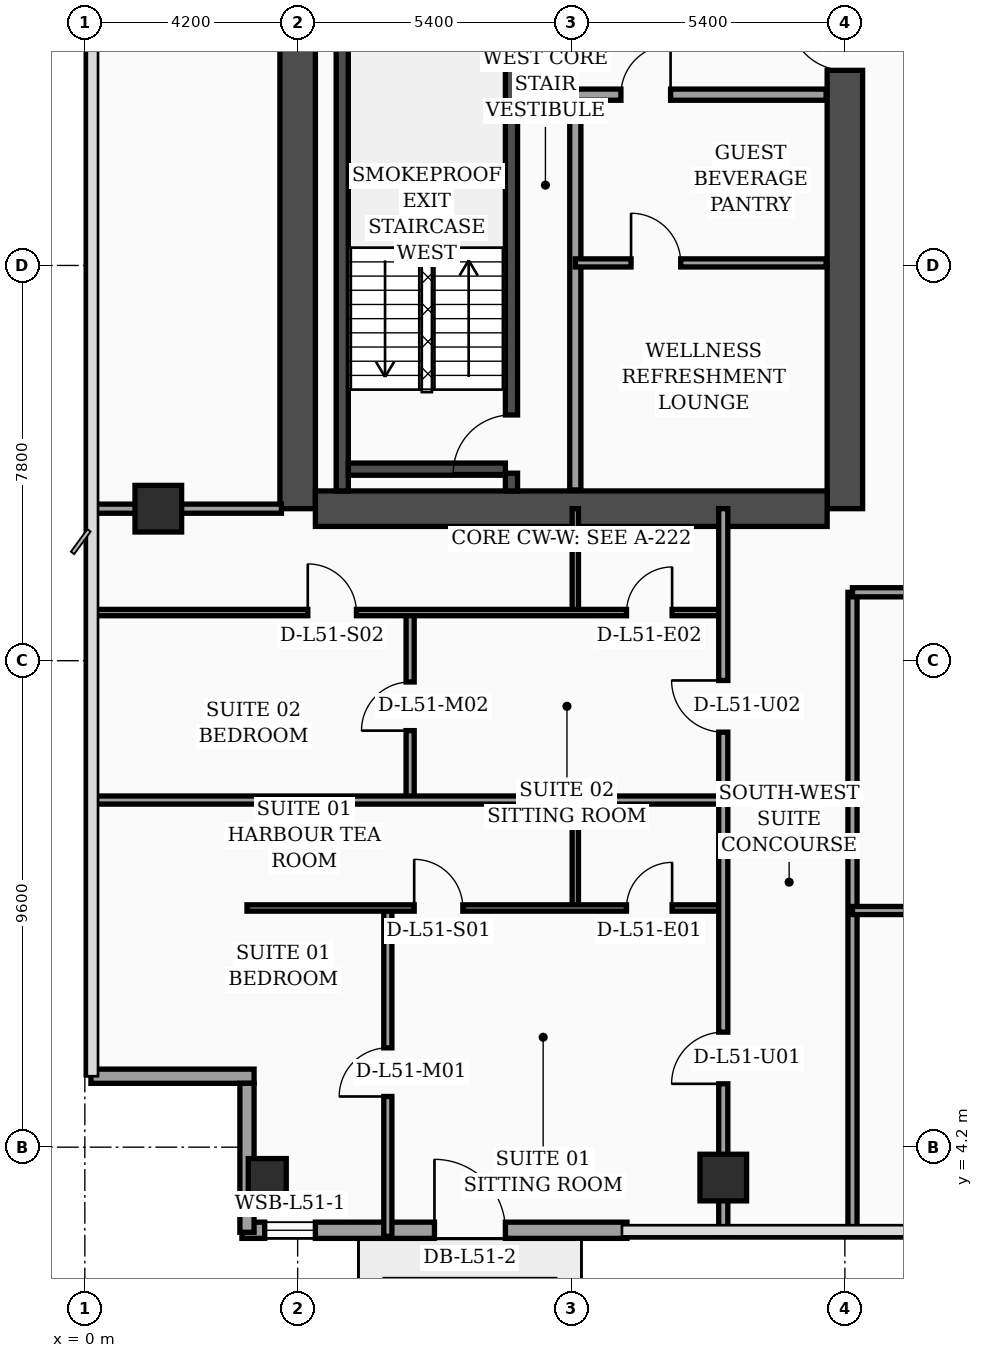
"""IFC4 building model, lengths in metres.
Left out: names, types, materials, properties, quantities, classifications, styles, units other than length and angle.
Written with IfcOpenShell. Run it as: python <this file> out.ifc"""

import sys

from ifc_helpers import new_model, si_unit, direction, frame, frame_2d, origin, origin_2d, place, context, subcontext, project, spatial, rectangle, hollow_rectangle, extrude, element, fill, save


model = new_model("IFC4")
c1 = context("Model", 3, precision=1e-05, world=origin(), true_north=direction((0.0, 1.0)))
c2 = subcontext(c1, "Body", "Model", "MODEL_VIEW")
j1 = project(units=[si_unit("LENGTHUNIT", "METRE"), si_unit("PLANEANGLEUNIT", "RADIAN")], contexts=[c1])
p1 = place(None, origin())
s1 = spatial("IfcSite", under=j1, at=p1, CompositionType="ELEMENT")
p2 = place(p1, origin())
s2 = spatial("IfcBuilding", under=s1, at=p2, CompositionType="ELEMENT")
p3 = place(p2, frame((0.0, 0.0, 207.2)))
s3 = spatial("IfcBuildingStorey", under=s2, at=p3, CompositionType="ELEMENT", Elevation=207.2)
p4 = place(p3, frame((4.2, 16.8, 0.0), z_axis=(0.0, 0.0, 1.0), x_axis=(0.0, 1.0, 0.0)))
e1 = element("IfcWall", 1, at=p4, inside=s3, PredefinedType="SHEAR", context=c2, shape_type="SweptSolid", body=[
    extrude(rectangle(XDim=21.6, YDim=0.7, at=frame_2d((10.8, 0.0))), origin(), (0.0, 0.0, 1.0), 3.56),
])
p5 = place(p3, frame((15.0, 16.8, 0.0), z_axis=(0.0, 0.0, 1.0), x_axis=(0.0, 1.0, 0.0)))
e2 = element("IfcWall", 2, at=p5, inside=s3, PredefinedType="SHEAR", context=c2, shape_type="SweptSolid", body=[
    extrude(rectangle(XDim=21.6, YDim=0.7, at=frame_2d((10.8, 0.0))), origin(), (0.0, 0.0, 1.0), 3.56),
])
p6 = place(p5, frame((8.65, 0.0, 0.0)))
e3 = element("IfcOpeningElement", 3, at=p6, cuts=e2, PredefinedType="OPENING", context=c2, shape_type="SweptSolid", body=[
    extrude(rectangle(XDim=1.1, YDim=2.2, at=frame_2d((0.55, 1.1))), frame((0.0, 0.36, 0.0), z_axis=(0.0, -1.0, 0.0), x_axis=(1.0, 0.0, 0.0)), (0.0, 0.0, 1.0), 0.72),
])
p7 = place(p5, frame((10.85, 0.0, 0.0)))
e4 = element("IfcOpeningElement", 4, at=p7, cuts=e2, PredefinedType="OPENING", context=c2, shape_type="SweptSolid", body=[
    extrude(rectangle(XDim=1.1, YDim=2.2, at=frame_2d((0.55, 1.1))), frame((0.0, 0.36, 0.0), z_axis=(0.0, -1.0, 0.0), x_axis=(1.0, 0.0, 0.0)), (0.0, 0.0, 1.0), 0.72),
])
p8 = place(p5, frame((13.5, 0.0, 0.0)))
e5 = element("IfcOpeningElement", 5, at=p8, cuts=e2, PredefinedType="OPENING", context=c2, shape_type="SweptSolid", body=[
    extrude(rectangle(XDim=1.1, YDim=2.2, at=frame_2d((0.55, 1.1))), frame((0.0, 0.36, 0.0), z_axis=(0.0, -1.0, 0.0), x_axis=(1.0, 0.0, 0.0)), (0.0, 0.0, 1.0), 0.72),
])
p9 = place(p5, frame((16.15, 0.0, 0.0)))
e6 = element("IfcOpeningElement", 6, at=p9, cuts=e2, PredefinedType="OPENING", context=c2, shape_type="SweptSolid", body=[
    extrude(rectangle(XDim=1.1, YDim=2.2, at=frame_2d((0.55, 1.1))), frame((0.0, 0.36, 0.0), z_axis=(0.0, -1.0, 0.0), x_axis=(1.0, 0.0, 0.0)), (0.0, 0.0, 1.0), 0.72),
])
p10 = place(p3, frame((4.55, 16.8, 0.0), z_axis=(0.0, 0.0, 1.0), x_axis=(1.0, 0.0, 0.0)))
e7 = element("IfcWall", 7, at=p10, inside=s3, PredefinedType="SHEAR", context=c2, shape_type="SweptSolid", body=[
    extrude(rectangle(XDim=10.1, YDim=0.7, at=frame_2d((5.05, 0.0))), origin(), (0.0, 0.0, 1.0), 3.56),
])
p11 = place(p3, frame((5.08, 17.15, 0.0), z_axis=(0.0, 0.0, 1.0), x_axis=(0.0, 1.0, 0.0)))
e8 = element("IfcWall", 8, at=p11, inside=s3, PredefinedType="SOLIDWALL", context=c2, shape_type="SweptSolid", body=[
    extrude(rectangle(XDim=9.64, YDim=0.24, at=frame_2d((4.82, 0.0))), origin(), (0.0, 0.0, 1.0), 3.56),
])
p12 = place(p3, frame((8.42, 17.15, 0.0), z_axis=(0.0, 0.0, 1.0), x_axis=(0.0, 1.0, 0.0)))
e9 = element("IfcWall", 9, at=p12, inside=s3, PredefinedType="SOLIDWALL", context=c2, shape_type="SweptSolid", body=[
    extrude(rectangle(XDim=9.64, YDim=0.24, at=frame_2d((4.82, 0.0))), origin(), (0.0, 0.0, 1.0), 3.56),
])
p13 = place(p12, frame((0.35, 0.0, 0.0)))
e10 = element("IfcOpeningElement", 10, at=p13, cuts=e9, PredefinedType="OPENING", context=c2, shape_type="SweptSolid", body=[
    extrude(rectangle(XDim=1.15, YDim=2.2, at=frame_2d((0.575, 1.1))), frame((0.0, 0.13, 0.0), z_axis=(0.0, -1.0, 0.0), x_axis=(1.0, 0.0, 0.0)), (0.0, 0.0, 1.0), 0.26),
])
p14 = place(p3, frame((5.2, 17.58, 0.0), z_axis=(0.0, 0.0, 1.0), x_axis=(1.0, 0.0, 0.0)))
e11 = element("IfcWall", 11, at=p14, inside=s3, PredefinedType="SOLIDWALL", context=c2, shape_type="SweptSolid", body=[
    extrude(rectangle(XDim=3.1, YDim=0.24, at=frame_2d((1.55, 0.0))), origin(), (0.0, 0.0, 1.0), 3.56),
])
p15 = place(p3, frame((3.6, 3.6, 0.0), z_axis=(0.0, 0.0, 1.0), x_axis=(1.0, 0.0, 0.0)))
e12 = element("IfcColumn", 12, at=p15, inside=s3, PredefinedType="COLUMN", context=c2, shape_type="SweptSolid", body=[
    extrude(hollow_rectangle(XDim=0.75, YDim=0.75, WallThickness=0.032, at=origin_2d()), origin(), (0.0, 0.0, 1.0), 3.56),
])
for number, where, z_axis, x_axis in (
    (13, (1.45, 16.8, 0.0), (0.0, 0.0, 1.0), (1.0, 0.0, 0.0)),
    (14, (12.6, 3.6, 0.0), (0.0, 0.0, 1.0), (1.0, 0.0, 0.0)),
):
    element("IfcColumn", number, at=place(p3, frame(where, z_axis=z_axis, x_axis=x_axis)), inside=s3, PredefinedType="COLUMN", context=c2, shape_type="SweptSolid", body=[
        extrude(rectangle(XDim=0.92, YDim=0.92, at=origin_2d()), origin(), (0.0, 0.0, 1.0), 3.56),
    ])
p16 = place(p3, frame((3.1, 2.56, 0.0), z_axis=(0.0, 0.0, 1.0), x_axis=(1.0, 0.0, 0.0)))
e15 = element("IfcWall", 15, at=p16, inside=s3, PredefinedType="SOLIDWALL", context=c2, shape_type="SweptSolid", body=[
    extrude(rectangle(XDim=7.6, YDim=0.32, at=frame_2d((3.8, 0.0))), origin(), (0.0, 0.0, 1.0), 3.56),
])
p17 = place(p16, frame((0.45, 0.0, 0.75)))
e16 = element("IfcOpeningElement", 16, at=p17, cuts=e15, PredefinedType="OPENING", context=c2, shape_type="SweptSolid", body=[
    extrude(rectangle(XDim=1.0, YDim=1.6, at=frame_2d((0.5, 0.8))), frame((0.0, 0.17, 0.0), z_axis=(0.0, -1.0, 0.0), x_axis=(1.0, 0.0, 0.0)), (0.0, 0.0, 1.0), 0.34),
])
p18 = place(p16, frame((3.8, 0.0, 0.0)))
e17 = element("IfcOpeningElement", 17, at=p18, cuts=e15, PredefinedType="OPENING", context=c2, shape_type="SweptSolid", body=[
    extrude(rectangle(XDim=1.4, YDim=2.25, at=frame_2d((0.7, 1.125))), frame((0.0, 0.17, 0.0), z_axis=(0.0, -1.0, 0.0), x_axis=(1.0, 0.0, 0.0)), (0.0, 0.0, 1.0), 0.34),
])
p19 = place(p3, frame((0.12, 5.6, 0.0), z_axis=(0.0, 0.0, 1.0), x_axis=(1.0, 0.0, 0.0)))
e18 = element("IfcWall", 18, at=p19, inside=s3, PredefinedType="SOLIDWALL", context=c2, shape_type="SweptSolid", body=[
    extrude(rectangle(XDim=3.22, YDim=0.28, at=frame_2d((1.61, 0.0))), origin(), (0.0, 0.0, 1.0), 2.94),
])
p20 = place(p3, frame((3.2, 5.46, 0.0), z_axis=(0.0, 0.0, 1.0), x_axis=(0.0, -1.0, 0.0)))
e19 = element("IfcWall", 19, at=p20, inside=s3, PredefinedType="SOLIDWALL", context=c2, shape_type="SweptSolid", body=[
    extrude(rectangle(XDim=2.94, YDim=0.28, at=frame_2d((1.47, 0.0))), origin(), (0.0, 0.0, 1.0), 2.94),
])
p21 = place(p3, frame((9.68, 17.17, 0.0), z_axis=(0.0, 0.0, 1.0), x_axis=(0.0, 1.0, 0.0)))
e20 = element("IfcWall", 20, at=p21, inside=s3, PredefinedType="SOLIDWALL", context=c2, shape_type="SweptSolid", body=[
    extrude(rectangle(XDim=7.83, YDim=0.22, at=frame_2d((3.915, 0.0))), origin(), (0.0, 0.0, 1.0), 3.56),
])
p22 = place(p3, frame((9.68, 21.65, 0.0), z_axis=(0.0, 0.0, 1.0), x_axis=(1.0, 0.0, 0.0)))
e21 = element("IfcWall", 21, at=p22, inside=s3, PredefinedType="PARTITIONING", context=c2, shape_type="SweptSolid", body=[
    extrude(rectangle(XDim=4.95, YDim=0.16, at=frame_2d((2.475, 0.0))), origin(), (0.0, 0.0, 1.0), 3.09),
])
p23 = place(p22, frame((1.1, 0.0, 0.0)))
e22 = element("IfcOpeningElement", 22, at=p23, cuts=e21, PredefinedType="OPENING", context=c2, shape_type="SweptSolid", body=[
    extrude(rectangle(XDim=0.98, YDim=2.15, at=frame_2d((0.49, 1.075))), frame((0.0, 0.09, 0.0), z_axis=(0.0, -1.0, 0.0), x_axis=(1.0, 0.0, 0.0)), (0.0, 0.0, 1.0), 0.18),
])
p24 = place(p3, frame((9.68, 24.97, 0.0), z_axis=(0.0, 0.0, 1.0), x_axis=(1.0, 0.0, 0.0)))
e23 = element("IfcWall", 23, at=p24, inside=s3, PredefinedType="SOLIDWALL", context=c2, shape_type="SweptSolid", body=[
    extrude(rectangle(XDim=4.95, YDim=0.22, at=frame_2d((2.475, 0.0))), origin(), (0.0, 0.0, 1.0), 2.94),
])
p25 = place(p24, frame((0.9, 0.0, 0.0)))
e24 = element("IfcOpeningElement", 24, at=p25, cuts=e23, PredefinedType="OPENING", context=c2, shape_type="SweptSolid", body=[
    extrude(rectangle(XDim=0.98, YDim=2.15, at=frame_2d((0.49, 1.075))), frame((0.0, 0.12, 0.0), z_axis=(0.0, -1.0, 0.0), x_axis=(1.0, 0.0, 0.0)), (0.0, 0.0, 1.0), 0.24),
])
p26 = place(p3, frame((0.08, 16.8, 0.0), z_axis=(0.0, 0.0, 1.0), x_axis=(1.0, 0.0, 0.0)))
e25 = element("IfcWall", 25, at=p26, inside=s3, PredefinedType="PARTITIONING", context=c2, shape_type="SweptSolid", body=[
    extrude(rectangle(XDim=3.8, YDim=0.18, at=frame_2d((1.9, 0.0))), origin(), (0.0, 0.0, 1.0), 2.94),
])
p27 = place(p3, frame((9.68, 8.92, 0.0), z_axis=(0.0, 0.0, 1.0), x_axis=(0.0, 1.0, 0.0)))
e26 = element("IfcWall", 26, at=p27, inside=s3, PredefinedType="PARTITIONING", context=c2, shape_type="SweptSolid", body=[
    extrude(rectangle(XDim=2.13, YDim=0.125, at=frame_2d((1.065, 0.0))), origin(), (0.0, 0.0, 1.0), 3.09),
])
p28 = place(p3, frame((5.98, 2.44, 0.0), z_axis=(0.0, 0.0, 1.0), x_axis=(0.0, 1.0, 0.0)))
e27 = element("IfcWall", 27, at=p28, inside=s3, PredefinedType="PARTITIONING", context=c2, shape_type="SweptSolid", body=[
    extrude(rectangle(XDim=6.48, YDim=0.16, at=frame_2d((3.24, 0.0))), origin(), (0.0, 0.0, 1.0), 3.09),
])
p29 = place(p28, frame((2.76, 0.0, 0.0)))
e28 = element("IfcOpeningElement", 28, at=p29, cuts=e27, PredefinedType="OPENING", context=c2, shape_type="SweptSolid", body=[
    extrude(rectangle(XDim=0.96, YDim=2.2, at=frame_2d((0.48, 1.1))), frame((0.0, 0.09, 0.0), z_axis=(0.0, -1.0, 0.0), x_axis=(1.0, 0.0, 0.0)), (0.0, 0.0, 1.0), 0.18),
])
p30 = place(p3, frame((3.2, 8.92, 0.0), z_axis=(0.0, 0.0, 1.0), x_axis=(1.0, 0.0, 0.0)))
e29 = element("IfcWall", 29, at=p30, inside=s3, PredefinedType="PARTITIONING", context=c2, shape_type="SweptSolid", body=[
    extrude(rectangle(XDim=9.4, YDim=0.125, at=frame_2d((4.7, 0.0))), origin(), (0.0, 0.0, 1.0), 2.94),
])
p31 = place(p30, frame((3.3, 0.0, 0.0)))
e30 = element("IfcOpeningElement", 30, at=p31, cuts=e29, PredefinedType="OPENING", context=c2, shape_type="SweptSolid", body=[
    extrude(rectangle(XDim=0.96, YDim=2.2, at=frame_2d((0.48, 1.1))), frame((0.0, 0.073, 0.0), z_axis=(0.0, -1.0, 0.0), x_axis=(1.0, 0.0, 0.0)), (0.0, 0.0, 1.0), 0.145),
])
p32 = place(p30, frame((7.49, 0.0, 0.0)))
e31 = element("IfcOpeningElement", 31, at=p32, cuts=e29, PredefinedType="OPENING", context=c2, shape_type="SweptSolid", body=[
    extrude(rectangle(XDim=0.9, YDim=2.15, at=frame_2d((0.45, 1.075))), frame((0.0, 0.073, 0.0), z_axis=(0.0, -1.0, 0.0), x_axis=(1.0, 0.0, 0.0)), (0.0, 0.0, 1.0), 0.145),
])
p33 = place(p3, frame((9.68, 14.75, 0.0), z_axis=(0.0, 0.0, 1.0), x_axis=(0.0, 1.0, 0.0)))
e32 = element("IfcWall", 32, at=p33, inside=s3, PredefinedType="PARTITIONING", context=c2, shape_type="SweptSolid", body=[
    extrude(rectangle(XDim=2.05, YDim=0.125, at=frame_2d((1.025, 0.0))), origin(), (0.0, 0.0, 1.0), 3.56),
])
p34 = place(p3, frame((6.42, 11.05, 0.0), z_axis=(0.0, 0.0, 1.0), x_axis=(0.0, 1.0, 0.0)))
e33 = element("IfcWall", 33, at=p34, inside=s3, PredefinedType="PARTITIONING", context=c2, shape_type="SweptSolid", body=[
    extrude(rectangle(XDim=3.7, YDim=0.16, at=frame_2d((1.85, 0.0))), origin(), (0.0, 0.0, 1.0), 3.56),
])
p35 = place(p34, frame((1.37, 0.0, 0.0)))
e34 = element("IfcOpeningElement", 34, at=p35, cuts=e33, PredefinedType="OPENING", context=c2, shape_type="SweptSolid", body=[
    extrude(rectangle(XDim=0.96, YDim=2.2, at=frame_2d((0.48, 1.1))), frame((0.0, 0.09, 0.0), z_axis=(0.0, -1.0, 0.0), x_axis=(1.0, 0.0, 0.0)), (0.0, 0.0, 1.0), 0.18),
])
p36 = place(p3, frame((0.08, 14.75, 0.0), z_axis=(0.0, 0.0, 1.0), x_axis=(1.0, 0.0, 0.0)))
e35 = element("IfcWall", 35, at=p36, inside=s3, PredefinedType="PARTITIONING", context=c2, shape_type="SweptSolid", body=[
    extrude(rectangle(XDim=12.52, YDim=0.125, at=frame_2d((6.26, 0.0))), origin(), (0.0, 0.0, 1.0), 2.94),
])
p37 = place(p36, frame((4.32, 0.0, 0.0)))
e36 = element("IfcOpeningElement", 36, at=p37, cuts=e35, PredefinedType="OPENING", context=c2, shape_type="SweptSolid", body=[
    extrude(rectangle(XDim=0.96, YDim=2.2, at=frame_2d((0.48, 1.1))), frame((0.0, 0.073, 0.0), z_axis=(0.0, -1.0, 0.0), x_axis=(1.0, 0.0, 0.0)), (0.0, 0.0, 1.0), 0.145),
])
p38 = place(p36, frame((10.61, 0.0, 0.0)))
e37 = element("IfcOpeningElement", 37, at=p38, cuts=e35, PredefinedType="OPENING", context=c2, shape_type="SweptSolid", body=[
    extrude(rectangle(XDim=0.9, YDim=2.15, at=frame_2d((0.45, 1.075))), frame((0.0, 0.073, 0.0), z_axis=(0.0, -1.0, 0.0), x_axis=(1.0, 0.0, 0.0)), (0.0, 0.0, 1.0), 0.145),
])
p39 = place(p3, frame((0.08, 11.05, 0.0), z_axis=(0.0, 0.0, 1.0), x_axis=(1.0, 0.0, 0.0)))
e38 = element("IfcWall", 38, at=p39, inside=s3, PredefinedType="PARTITIONING", context=c2, shape_type="SweptSolid", body=[
    extrude(rectangle(XDim=12.52, YDim=0.16, at=frame_2d((6.26, 0.0))), origin(), (0.0, 0.0, 1.0), 2.94),
])
p40 = place(p3, frame((12.6, 2.44, 0.0), z_axis=(0.0, 0.0, 1.0), x_axis=(0.0, 1.0, 0.0)))
e39 = element("IfcWall", 39, at=p40, inside=s3, PredefinedType="PARTITIONING", context=c2, shape_type="SweptSolid", body=[
    extrude(rectangle(XDim=14.36, YDim=0.18, at=frame_2d((7.18, 0.0))), origin(), (0.0, 0.0, 1.0), 2.94),
])
p41 = place(p40, frame((3.01, 0.0, 0.0)))
e40 = element("IfcOpeningElement", 40, at=p41, cuts=e39, PredefinedType="OPENING", context=c2, shape_type="SweptSolid", body=[
    extrude(rectangle(XDim=1.02, YDim=2.2, at=frame_2d((0.51, 1.1))), frame((0.0, 0.1, 0.0), z_axis=(0.0, -1.0, 0.0), x_axis=(1.0, 0.0, 0.0)), (0.0, 0.0, 1.0), 0.2),
])
p42 = place(p40, frame((9.95, 0.0, 0.0)))
e41 = element("IfcOpeningElement", 41, at=p42, cuts=e39, PredefinedType="OPENING", context=c2, shape_type="SweptSolid", body=[
    extrude(rectangle(XDim=1.02, YDim=2.2, at=frame_2d((0.51, 1.1))), frame((0.0, 0.1, 0.0), z_axis=(0.0, -1.0, 0.0), x_axis=(1.0, 0.0, 0.0)), (0.0, 0.0, 1.0), 0.2),
])
p43 = place(p3, frame((15.15, 2.44, 0.0), z_axis=(0.0, 0.0, 1.0), x_axis=(0.0, 1.0, 0.0)))
e42 = element("IfcWall", 42, at=p43, inside=s3, PredefinedType="PARTITIONING", context=c2, shape_type="SweptSolid", body=[
    extrude(rectangle(XDim=12.71, YDim=0.18, at=frame_2d((6.355, 0.0))), origin(), (0.0, 0.0, 1.0), 3.09),
])
p44 = place(p3, frame((15.15, 8.87, 0.0), z_axis=(0.0, 0.0, 1.0), x_axis=(1.0, 0.0, 0.0)))
e43 = element("IfcWall", 43, at=p44, inside=s3, PredefinedType="PARTITIONING", context=c2, shape_type="SweptSolid", body=[
    extrude(rectangle(XDim=4.45, YDim=0.16, at=frame_2d((2.225, 0.0))), origin(), (0.0, 0.0, 1.0), 3.56),
])
p45 = place(p44, frame((1.75, 0.0, 0.0)))
e44 = element("IfcOpeningElement", 44, at=p45, cuts=e43, PredefinedType="OPENING", context=c2, shape_type="SweptSolid", body=[
    extrude(rectangle(XDim=0.96, YDim=2.2, at=frame_2d((0.48, 1.1))), frame((0.0, 0.09, 0.0), z_axis=(0.0, -1.0, 0.0), x_axis=(1.0, 0.0, 0.0)), (0.0, 0.0, 1.0), 0.18),
])
p46 = place(p3, frame((15.15, 15.15, 0.0), z_axis=(0.0, 0.0, 1.0), x_axis=(1.0, 0.0, 0.0)))
e45 = element("IfcWall", 45, at=p46, inside=s3, PredefinedType="PARTITIONING", context=c2, shape_type="SweptSolid", body=[
    extrude(rectangle(XDim=6.45, YDim=0.18, at=frame_2d((3.225, 0.0))), origin(), (0.0, 0.0, 1.0), 2.59),
])
p47 = place(p46, frame((1.74, 0.0, 0.0)))
e46 = element("IfcOpeningElement", 46, at=p47, cuts=e45, PredefinedType="OPENING", context=c2, shape_type="SweptSolid", body=[
    extrude(rectangle(XDim=1.02, YDim=2.2, at=frame_2d((0.51, 1.1))), frame((0.0, 0.1, 0.0), z_axis=(0.0, -1.0, 0.0), x_axis=(1.0, 0.0, 0.0)), (0.0, 0.0, 1.0), 0.2),
])
p48 = place(p17, origin())
e47 = element("IfcWindow", 47, at=p48, inside=s3, PartitioningType="SINGLE_PANEL", PredefinedType="WINDOW", context=c2, shape_type="SweptSolid", body=[
    extrude(rectangle(XDim=1.0, YDim=1.6, at=frame_2d((0.5, 0.8))), frame((0.0, 0.03, 0.0), z_axis=(0.0, -1.0, 0.0), x_axis=(1.0, 0.0, 0.0)), (0.0, 0.0, 1.0), 0.06),
])
fill(e16, e47)
p49 = place(p18, origin())
e48 = element("IfcDoor", 48, at=p49, inside=s3, OperationType="SINGLE_SWING_LEFT", PredefinedType="DOOR", context=c2, shape_type="SweptSolid", body=[
    extrude(rectangle(XDim=1.4, YDim=2.25, at=frame_2d((0.7, 1.125))), frame((0.0, 0.025, 0.0), z_axis=(0.0, -1.0, 0.0), x_axis=(1.0, 0.0, 0.0)), (0.0, 0.0, 1.0), 0.05),
])
fill(e17, e48)
p50 = place(p23, origin())
e49 = element("IfcDoor", 49, at=p50, inside=s3, OperationType="SINGLE_SWING_LEFT", PredefinedType="DOOR", context=c2, shape_type="SweptSolid", body=[
    extrude(rectangle(XDim=0.98, YDim=2.15, at=frame_2d((0.49, 1.075))), frame((0.0, 0.025, 0.0), z_axis=(0.0, -1.0, 0.0), x_axis=(1.0, 0.0, 0.0)), (0.0, 0.0, 1.0), 0.05),
])
fill(e22, e49)
p51 = place(p25, origin())
e50 = element("IfcDoor", 50, at=p51, inside=s3, OperationType="SINGLE_SWING_RIGHT", PredefinedType="DOOR", context=c2, shape_type="SweptSolid", body=[
    extrude(rectangle(XDim=0.98, YDim=2.15, at=frame_2d((0.49, 1.075))), frame((0.0, 0.025, 0.0), z_axis=(0.0, -1.0, 0.0), x_axis=(1.0, 0.0, 0.0)), (0.0, 0.0, 1.0), 0.05),
])
fill(e24, e50)
p52 = place(p29, origin())
e51 = element("IfcDoor", 51, at=p52, inside=s3, OperationType="SINGLE_SWING_LEFT", PredefinedType="DOOR", context=c2, shape_type="SweptSolid", body=[
    extrude(rectangle(XDim=0.96, YDim=2.2, at=frame_2d((0.48, 1.1))), frame((0.0, 0.025, 0.0), z_axis=(0.0, -1.0, 0.0), x_axis=(1.0, 0.0, 0.0)), (0.0, 0.0, 1.0), 0.05),
])
fill(e28, e51)
p53 = place(p31, origin())
e52 = element("IfcDoor", 52, at=p53, inside=s3, OperationType="SINGLE_SWING_LEFT", PredefinedType="DOOR", context=c2, shape_type="SweptSolid", body=[
    extrude(rectangle(XDim=0.96, YDim=2.2, at=frame_2d((0.48, 1.1))), frame((0.0, 0.025, 0.0), z_axis=(0.0, -1.0, 0.0), x_axis=(1.0, 0.0, 0.0)), (0.0, 0.0, 1.0), 0.05),
])
fill(e30, e52)
p54 = place(p32, origin())
e53 = element("IfcDoor", 53, at=p54, inside=s3, OperationType="SINGLE_SWING_RIGHT", PredefinedType="DOOR", context=c2, shape_type="SweptSolid", body=[
    extrude(rectangle(XDim=0.9, YDim=2.15, at=frame_2d((0.45, 1.075))), frame((0.0, 0.025, 0.0), z_axis=(0.0, -1.0, 0.0), x_axis=(1.0, 0.0, 0.0)), (0.0, 0.0, 1.0), 0.05),
])
fill(e31, e53)
p55 = place(p35, origin())
e54 = element("IfcDoor", 54, at=p55, inside=s3, OperationType="SINGLE_SWING_LEFT", PredefinedType="DOOR", context=c2, shape_type="SweptSolid", body=[
    extrude(rectangle(XDim=0.96, YDim=2.2, at=frame_2d((0.48, 1.1))), frame((0.0, 0.025, 0.0), z_axis=(0.0, -1.0, 0.0), x_axis=(1.0, 0.0, 0.0)), (0.0, 0.0, 1.0), 0.05),
])
fill(e34, e54)
p56 = place(p37, origin())
e55 = element("IfcDoor", 55, at=p56, inside=s3, OperationType="SINGLE_SWING_LEFT", PredefinedType="DOOR", context=c2, shape_type="SweptSolid", body=[
    extrude(rectangle(XDim=0.96, YDim=2.2, at=frame_2d((0.48, 1.1))), frame((0.0, 0.025, 0.0), z_axis=(0.0, -1.0, 0.0), x_axis=(1.0, 0.0, 0.0)), (0.0, 0.0, 1.0), 0.05),
])
fill(e36, e55)
p57 = place(p38, origin())
e56 = element("IfcDoor", 56, at=p57, inside=s3, OperationType="SINGLE_SWING_RIGHT", PredefinedType="DOOR", context=c2, shape_type="SweptSolid", body=[
    extrude(rectangle(XDim=0.9, YDim=2.15, at=frame_2d((0.45, 1.075))), frame((0.0, 0.025, 0.0), z_axis=(0.0, -1.0, 0.0), x_axis=(1.0, 0.0, 0.0)), (0.0, 0.0, 1.0), 0.05),
])
fill(e37, e56)
p58 = place(p41, origin())
e57 = element("IfcDoor", 57, at=p58, inside=s3, OperationType="SINGLE_SWING_LEFT", PredefinedType="DOOR", context=c2, shape_type="SweptSolid", body=[
    extrude(rectangle(XDim=1.02, YDim=2.2, at=frame_2d((0.51, 1.1))), frame((0.0, 0.025, 0.0), z_axis=(0.0, -1.0, 0.0), x_axis=(1.0, 0.0, 0.0)), (0.0, 0.0, 1.0), 0.05),
])
fill(e40, e57)
p59 = place(p42, origin())
e58 = element("IfcDoor", 58, at=p59, inside=s3, OperationType="SINGLE_SWING_RIGHT", PredefinedType="DOOR", context=c2, shape_type="SweptSolid", body=[
    extrude(rectangle(XDim=1.02, YDim=2.2, at=frame_2d((0.51, 1.1))), frame((0.0, 0.025, 0.0), z_axis=(0.0, -1.0, 0.0), x_axis=(1.0, 0.0, 0.0)), (0.0, 0.0, 1.0), 0.05),
])
fill(e41, e58)
p60 = place(p13, origin())
e59 = element("IfcDoor", 59, at=p60, inside=s3, OperationType="SINGLE_SWING_LEFT", PredefinedType="DOOR", context=c2, shape_type="SweptSolid", body=[
    extrude(rectangle(XDim=1.15, YDim=2.2, at=frame_2d((0.575, 1.1))), frame((0.0, 0.025, 0.0), z_axis=(0.0, -1.0, 0.0), x_axis=(1.0, 0.0, 0.0)), (0.0, 0.0, 1.0), 0.05),
])
fill(e10, e59)
p61 = place(p6, origin())
e60 = element("IfcDoor", 60, at=p61, inside=s3, OperationType="SINGLE_SWING_RIGHT", PredefinedType="DOOR", context=c2, shape_type="SweptSolid", body=[
    extrude(rectangle(XDim=1.1, YDim=2.2, at=frame_2d((0.55, 1.1))), frame((0.0, 0.025, 0.0), z_axis=(0.0, -1.0, 0.0), x_axis=(1.0, 0.0, 0.0)), (0.0, 0.0, 1.0), 0.05),
])
fill(e3, e60)
save(model, sys.argv[1])
